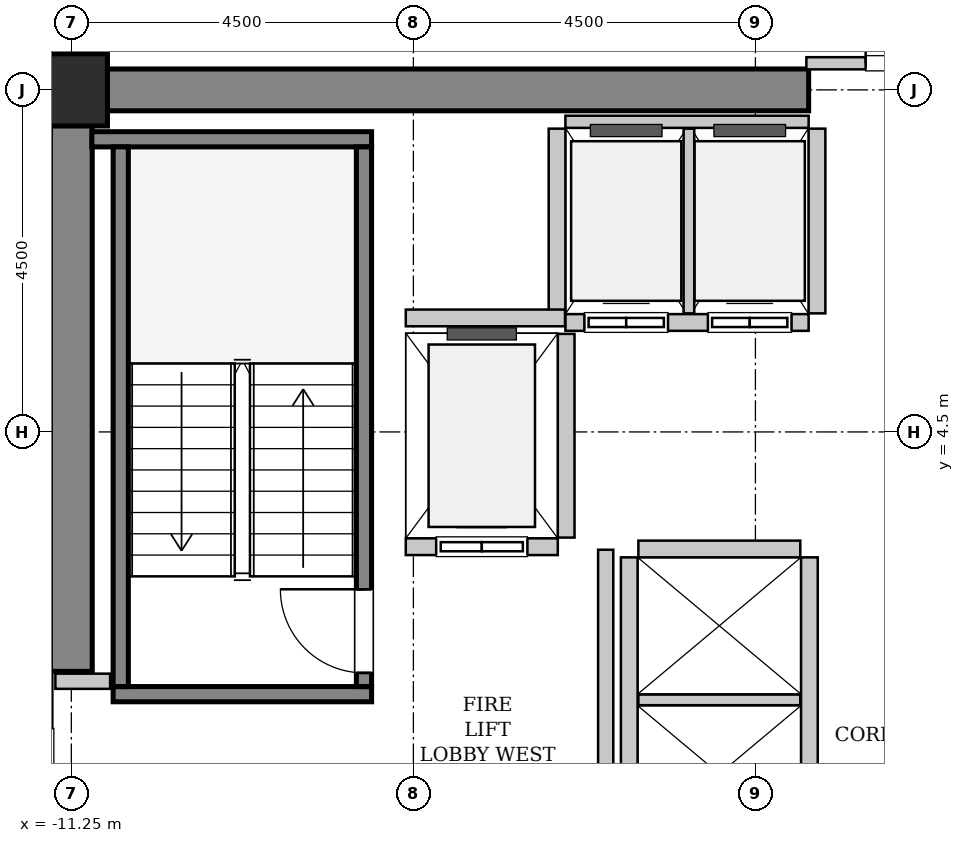
"""IFC4 building model, lengths in metres.
Left out: names, types, materials, properties, quantities, classifications, styles, units other than length and angle.
Written with IfcOpenShell. Run it as: python <this file> out.ifc"""

import sys

from ifc_helpers import new_model, si_unit, direction, frame, frame_2d, origin, origin_2d, place, context, subcontext, project, spatial, rectangle, hollow_rectangle, extrude, source, transform, mapped, element, fill, save


model = new_model("IFC4")
c1 = context("Model", 3, precision=1e-05, world=origin(), true_north=direction((0.0, 1.0)))
c2 = subcontext(c1, "Body", "Model", "MODEL_VIEW")
j1 = project(units=[si_unit("LENGTHUNIT", "METRE"), si_unit("PLANEANGLEUNIT", "RADIAN")], contexts=[c1])
p1 = place(None, origin())
s1 = spatial("IfcSite", under=j1, at=p1, CompositionType="ELEMENT")
p2 = place(p1, origin())
s2 = spatial("IfcBuilding", under=s1, at=p2, CompositionType="ELEMENT")
p3 = place(p2, frame((0.0, 0.0, 109.8)))
s3 = spatial("IfcBuildingStorey", under=s2, at=p3, CompositionType="ELEMENT", Elevation=109.8)
m1 = source(origin(), c2, "Body", "SweptSolid", [
    extrude(rectangle(XDim=9.975, YDim=0.55, at=frame_2d((4.987, 0.0))), origin(), (0.0, 0.0, 1.0), 3.8),
])
p4 = place(p3, frame((-11.525, 9.0, 0.0), z_axis=(0.0, 0.0, 1.0), x_axis=(1.0, 0.0, 0.0)))
e1 = element("IfcWall", 1, at=p4, inside=s3, PredefinedType="SHEAR", context=c2, shape_type="MappedRepresentation", body=[
    mapped(m1, transform((0.0, 0.0, 0.0), x_axis=(1.0, 0.0, 0.0), y_axis=(0.0, 1.0, 0.0), z_axis=(0.0, 0.0, 1.0), scale=1.0)),
])
m2 = source(origin(), c2, "Body", "SweptSolid", [
    extrude(rectangle(XDim=7.375, YDim=0.55, at=frame_2d((3.688, 0.0))), origin(), (0.0, 0.0, 1.0), 3.8),
])
p5 = place(p3, frame((-11.25, 1.35, 0.0), z_axis=(0.0, 0.0, 1.0), x_axis=(0.0, 1.0, 0.0)))
e2 = element("IfcWall", 2, at=p5, inside=s3, PredefinedType="SHEAR", context=c2, shape_type="MappedRepresentation", body=[
    mapped(m2, transform((0.0, 0.0, 0.0), x_axis=(1.0, 0.0, 0.0), y_axis=(0.0, 1.0, 0.0), z_axis=(0.0, 0.0, 1.0), scale=1.0)),
])
m3 = source(origin(), c2, "Body", "SweptSolid", [
    extrude(hollow_rectangle(XDim=0.95, YDim=0.95, WallThickness=0.045, InnerFilletRadius=0.045, OuterFilletRadius=0.09, at=origin_2d()), origin(), (0.0, 0.0, 1.0), 3.8),
])
p6 = place(p3, frame((-11.25, 9.0, 0.0), z_axis=(0.0, 0.0, 1.0), x_axis=(1.0, 0.0, 0.0)))
e3 = element("IfcColumn", 3, at=p6, inside=s3, PredefinedType="COLUMN", context=c2, shape_type="MappedRepresentation", body=[
    mapped(m3, transform((0.0, 0.0, 0.0), x_axis=(1.0, 0.0, 0.0), y_axis=(0.0, 1.0, 0.0), z_axis=(0.0, 0.0, 1.0), scale=1.0)),
])
m4 = source(origin(), c2, "Body", "SweptSolid", [
    extrude(rectangle(XDim=3.4, YDim=0.2, at=frame_2d((1.7, 0.0))), origin(), (0.0, 0.0, 1.0), 3.8),
])
p7 = place(p3, frame((-7.3, 1.05, 0.0), z_axis=(0.0, 0.0, 1.0), x_axis=(-1.0, 0.0, 0.0)))
e4 = element("IfcWall", 4, at=p7, inside=s3, PredefinedType="SOLIDWALL", context=c2, shape_type="MappedRepresentation", body=[
    mapped(m4, transform((0.0, 0.0, 0.0), x_axis=(1.0, 0.0, 0.0), y_axis=(0.0, 1.0, 0.0), z_axis=(0.0, 0.0, 1.0), scale=1.0)),
])
m5 = source(origin(), c2, "Body", "SweptSolid", [
    extrude(rectangle(XDim=3.68, YDim=0.2, at=frame_2d((1.84, 0.0))), origin(), (0.0, 0.0, 1.0), 3.8),
])
p8 = place(p3, frame((-7.3, 8.35, 0.0), z_axis=(0.0, 0.0, 1.0), x_axis=(-1.0, 0.0, 0.0)))
e5 = element("IfcWall", 5, at=p8, inside=s3, PredefinedType="SOLIDWALL", context=c2, shape_type="MappedRepresentation", body=[
    mapped(m5, transform((0.0, 0.0, 0.0), x_axis=(1.0, 0.0, 0.0), y_axis=(0.0, 1.0, 0.0), z_axis=(0.0, 0.0, 1.0), scale=1.0)),
])
m6 = source(origin(), c2, "Body", "SweptSolid", [
    extrude(rectangle(XDim=7.1, YDim=0.2, at=frame_2d((3.55, 0.0))), origin(), (0.0, 0.0, 1.0), 3.8),
])
p9 = place(p3, frame((-7.4, 1.15, 0.0), z_axis=(0.0, 0.0, 1.0), x_axis=(0.0, 1.0, 0.0)))
e6 = element("IfcWall", 6, at=p9, inside=s3, PredefinedType="SOLIDWALL", context=c2, shape_type="MappedRepresentation", body=[
    mapped(m6, transform((0.0, 0.0, 0.0), x_axis=(1.0, 0.0, 0.0), y_axis=(0.0, 1.0, 0.0), z_axis=(0.0, 0.0, 1.0), scale=1.0)),
])
p10 = place(p9, frame((0.18, 0.0, 0.0)))
e7 = element("IfcOpeningElement", 7, at=p10, cuts=e6, PredefinedType="OPENING", context=c2, shape_type="SweptSolid", body=[
    extrude(rectangle(XDim=1.1, YDim=2.15, at=frame_2d((0.55, 1.075))), frame((0.0, 0.11, 0.0), z_axis=(0.0, -1.0, 0.0), x_axis=(1.0, 0.0, 0.0)), (0.0, 0.0, 1.0), 0.22),
])
p11 = place(p3, frame((-10.6, 1.15, 0.0), z_axis=(0.0, 0.0, 1.0), x_axis=(0.0, 1.0, 0.0)))
e8 = element("IfcWall", 8, at=p11, inside=s3, PredefinedType="SOLIDWALL", context=c2, shape_type="MappedRepresentation", body=[
    mapped(m6, transform((0.0, 0.0, 0.0), x_axis=(1.0, 0.0, 0.0), y_axis=(0.0, 1.0, 0.0), z_axis=(0.0, 0.0, 1.0), scale=1.0)),
])
m7 = source(origin(), c2, "Body", "SweptSolid", [
    extrude(rectangle(XDim=2.0, YDim=0.22, at=frame_2d((1.0, 0.0))), origin(), (0.0, 0.0, 1.0), 3.535),
])
p12 = place(p3, frame((-6.85, 2.99, 0.0), z_axis=(0.0, 0.0, 1.0), x_axis=(1.0, 0.0, 0.0)))
e9 = element("IfcWall", 9, at=p12, inside=s3, PredefinedType="SOLIDWALL", context=c2, shape_type="MappedRepresentation", body=[
    mapped(m7, transform((0.0, 0.0, 0.0), x_axis=(1.0, 0.0, 0.0), y_axis=(0.0, 1.0, 0.0), z_axis=(0.0, 0.0, 1.0), scale=1.0)),
])
p13 = place(p12, frame((0.4, 0.0, 0.0)))
e10 = element("IfcOpeningElement", 10, at=p13, cuts=e9, PredefinedType="OPENING", context=c2, shape_type="SweptSolid", body=[
    extrude(rectangle(XDim=1.2, YDim=2.2, at=frame_2d((0.6, 1.1))), frame((0.0, 0.12, 0.0), z_axis=(0.0, -1.0, 0.0), x_axis=(1.0, 0.0, 0.0)), (0.0, 0.0, 1.0), 0.24),
])
m8 = source(origin(), c2, "Body", "SweptSolid", [
    extrude(rectangle(XDim=2.68, YDim=0.22, at=frame_2d((1.34, 0.0))), origin(), (0.0, 0.0, 1.0), 3.535),
])
p14 = place(p3, frame((-4.74, 3.11, 0.0), z_axis=(0.0, 0.0, 1.0), x_axis=(0.0, 1.0, 0.0)))
e11 = element("IfcWall", 11, at=p14, inside=s3, PredefinedType="SOLIDWALL", context=c2, shape_type="MappedRepresentation", body=[
    mapped(m8, transform((0.0, 0.0, 0.0), x_axis=(1.0, 0.0, 0.0), y_axis=(0.0, 1.0, 0.0), z_axis=(0.0, 0.0, 1.0), scale=1.0)),
])
m9 = source(origin(), c2, "Body", "SweptSolid", [
    extrude(rectangle(XDim=3.2, YDim=0.22, at=frame_2d((1.6, 0.0))), origin(), (0.0, 0.0, 1.0), 3.535),
])
p15 = place(p3, frame((-4.75, 5.94, 0.0), z_axis=(0.0, 0.0, 1.0), x_axis=(1.0, 0.0, 0.0)))
e12 = element("IfcWall", 12, at=p15, inside=s3, PredefinedType="SOLIDWALL", context=c2, shape_type="MappedRepresentation", body=[
    mapped(m9, transform((0.0, 0.0, 0.0), x_axis=(1.0, 0.0, 0.0), y_axis=(0.0, 1.0, 0.0), z_axis=(0.0, 0.0, 1.0), scale=1.0)),
])
p16 = place(p15, frame((0.25, 0.0, 0.0)))
e13 = element("IfcOpeningElement", 13, at=p16, cuts=e12, PredefinedType="OPENING", context=c2, shape_type="SweptSolid", body=[
    extrude(rectangle(XDim=1.1, YDim=2.2, at=frame_2d((0.55, 1.1))), frame((0.0, 0.12, 0.0), z_axis=(0.0, -1.0, 0.0), x_axis=(1.0, 0.0, 0.0)), (0.0, 0.0, 1.0), 0.24),
])
p17 = place(p15, frame((1.875, 0.0, 0.0)))
e14 = element("IfcOpeningElement", 14, at=p17, cuts=e12, PredefinedType="OPENING", context=c2, shape_type="SweptSolid", body=[
    extrude(rectangle(XDim=1.1, YDim=2.2, at=frame_2d((0.55, 1.1))), frame((0.0, 0.12, 0.0), z_axis=(0.0, -1.0, 0.0), x_axis=(1.0, 0.0, 0.0)), (0.0, 0.0, 1.0), 0.24),
])
m10 = source(origin(), c2, "Body", "SweptSolid", [
    extrude(rectangle(XDim=3.2, YDim=0.16, at=frame_2d((1.6, 0.0))), origin(), (0.0, 0.0, 1.0), 2.425),
])
p18 = place(p3, frame((-1.55, 8.58, 0.0), z_axis=(0.0, 0.0, 1.0), x_axis=(-1.0, 0.0, 0.0)))
e15 = element("IfcWall", 15, at=p18, inside=s3, PredefinedType="PARTITIONING", context=c2, shape_type="MappedRepresentation", body=[
    mapped(m10, transform((0.0, 0.0, 0.0), x_axis=(1.0, 0.0, 0.0), y_axis=(0.0, 1.0, 0.0), z_axis=(0.0, 0.0, 1.0), scale=1.0)),
])
m11 = source(origin(), c2, "Body", "SweptSolid", [
    extrude(rectangle(XDim=2.43, YDim=0.22, at=frame_2d((1.215, 0.0))), origin(), (0.0, 0.0, 1.0), 3.535),
])
p19 = place(p3, frame((-4.86, 8.49, 0.0), z_axis=(0.0, 0.0, 1.0), x_axis=(0.0, -1.0, 0.0)))
e16 = element("IfcWall", 16, at=p19, inside=s3, PredefinedType="SOLIDWALL", context=c2, shape_type="MappedRepresentation", body=[
    mapped(m11, transform((0.0, 0.0, 0.0), x_axis=(1.0, 0.0, 0.0), y_axis=(0.0, 1.0, 0.0), z_axis=(0.0, 0.0, 1.0), scale=1.0)),
])
m12 = source(origin(), c2, "Body", "SweptSolid", [
    extrude(rectangle(XDim=2.43, YDim=0.14, at=frame_2d((1.215, 0.0))), origin(), (0.0, 0.0, 1.0), 3.535),
])
p20 = place(p3, frame((-3.125, 6.06, 0.0), z_axis=(0.0, 0.0, 1.0), x_axis=(0.0, 1.0, 0.0)))
e17 = element("IfcWall", 17, at=p20, inside=s3, PredefinedType="PARTITIONING", context=c2, shape_type="MappedRepresentation", body=[
    mapped(m12, transform((0.0, 0.0, 0.0), x_axis=(1.0, 0.0, 0.0), y_axis=(0.0, 1.0, 0.0), z_axis=(0.0, 0.0, 1.0), scale=1.0)),
])
p21 = place(p3, frame((-1.44, 6.06, 0.0), z_axis=(0.0, 0.0, 1.0), x_axis=(0.0, 1.0, 0.0)))
e18 = element("IfcWall", 18, at=p21, inside=s3, PredefinedType="SOLIDWALL", context=c2, shape_type="MappedRepresentation", body=[
    mapped(m11, transform((0.0, 0.0, 0.0), x_axis=(1.0, 0.0, 0.0), y_axis=(0.0, 1.0, 0.0), z_axis=(0.0, 0.0, 1.0), scale=1.0)),
])
m13 = source(origin(), c2, "Body", "SweptSolid", [
    extrude(rectangle(XDim=5.7, YDim=0.22, at=frame_2d((2.85, 0.0))), origin(), (0.0, 0.0, 1.0), 3.535),
])
for number, where, z_axis, x_axis in (
    (19, (-1.54, -2.85, 0.0), (0.0, 0.0, 1.0), (0.0, 1.0, 0.0)),
    (20, (-3.91, 2.85, 0.0), (0.0, 0.0, 1.0), (0.0, -1.0, 0.0)),
):
    element("IfcWall", number, at=place(p3, frame(where, z_axis=z_axis, x_axis=x_axis)), inside=s3, PredefinedType="SOLIDWALL", context=c2, shape_type="MappedRepresentation", body=[
        mapped(m13, transform((0.0, 0.0, 0.0), x_axis=(1.0, 0.0, 0.0), y_axis=(0.0, 1.0, 0.0), z_axis=(0.0, 0.0, 1.0), scale=1.0)),
    ])
m14 = source(origin(), c2, "Body", "SweptSolid", [
    extrude(rectangle(XDim=2.13, YDim=0.14, at=frame_2d((1.065, 0.0))), origin(), (0.0, 0.0, 1.0), 3.535),
])
p22 = place(p3, frame((-3.79, 0.975, 0.0), z_axis=(0.0, 0.0, 1.0), x_axis=(1.0, 0.0, 0.0)))
e21 = element("IfcWall", 21, at=p22, inside=s3, PredefinedType="PARTITIONING", context=c2, shape_type="MappedRepresentation", body=[
    mapped(m14, transform((0.0, 0.0, 0.0), x_axis=(1.0, 0.0, 0.0), y_axis=(0.0, 1.0, 0.0), z_axis=(0.0, 0.0, 1.0), scale=1.0)),
])
m15 = source(origin(), c2, "Body", "SweptSolid", [
    extrude(rectangle(XDim=2.13, YDim=0.22, at=frame_2d((1.065, 0.0))), origin(), (0.0, 0.0, 1.0), 3.535),
])
p23 = place(p3, frame((-1.66, 2.96, 0.0), z_axis=(0.0, 0.0, 1.0), x_axis=(-1.0, 0.0, 0.0)))
e22 = element("IfcWall", 22, at=p23, inside=s3, PredefinedType="SOLIDWALL", context=c2, shape_type="MappedRepresentation", body=[
    mapped(m15, transform((0.0, 0.0, 0.0), x_axis=(1.0, 0.0, 0.0), y_axis=(0.0, 1.0, 0.0), z_axis=(0.0, 0.0, 1.0), scale=1.0)),
])
m16 = source(origin(), c2, "Body", "SweptSolid", [
    extrude(rectangle(XDim=2.095, YDim=0.22, at=frame_2d((1.048, 0.0))), origin(), (0.0, 0.0, 1.0), 3.535),
])
p24 = place(p3, frame((-6.85, 6.0, 0.0), z_axis=(0.0, 0.0, 1.0), x_axis=(1.0, 0.0, 0.0)))
e23 = element("IfcWall", 23, at=p24, inside=s3, PredefinedType="SOLIDWALL", context=c2, shape_type="MappedRepresentation", body=[
    mapped(m16, transform((0.0, 0.0, 0.0), x_axis=(1.0, 0.0, 0.0), y_axis=(0.0, 1.0, 0.0), z_axis=(0.0, 0.0, 1.0), scale=1.0)),
])
m17 = source(origin(), c2, "Body", "SweptSolid", [
    extrude(rectangle(XDim=5.9, YDim=0.2, at=frame_2d((2.95, 0.0))), origin(), (0.0, 0.0, 1.0), 3.535),
])
p25 = place(p3, frame((-4.22, -2.95, 0.0), z_axis=(0.0, 0.0, 1.0), x_axis=(0.0, 1.0, 0.0)))
e24 = element("IfcWall", 24, at=p25, inside=s3, PredefinedType="PARTITIONING", context=c2, shape_type="MappedRepresentation", body=[
    mapped(m17, transform((0.0, 0.0, 0.0), x_axis=(1.0, 0.0, 0.0), y_axis=(0.0, 1.0, 0.0), z_axis=(0.0, 0.0, 1.0), scale=1.0)),
])
m18 = source(origin(), c2, "Body", "SweptSolid", [
    extrude(rectangle(XDim=0.72, YDim=0.2, at=frame_2d((0.36, 0.0))), origin(), (0.0, 0.0, 1.0), 3.535),
])
p26 = place(p3, frame((-11.46, 1.22, 0.0), z_axis=(0.0, 0.0, 1.0), x_axis=(1.0, 0.0, 0.0)))
e25 = element("IfcWall", 25, at=p26, inside=s3, PredefinedType="PARTITIONING", context=c2, shape_type="MappedRepresentation", body=[
    mapped(m18, transform((0.0, 0.0, 0.0), x_axis=(1.0, 0.0, 0.0), y_axis=(0.0, 1.0, 0.0), z_axis=(0.0, 0.0, 1.0), scale=1.0)),
])
m19 = source(origin(), c2, "Body", "SweptSolid", [
    extrude(rectangle(XDim=3.16, YDim=0.16, at=frame_2d((1.58, 0.0))), origin(), (0.0, 0.0, 1.0), 2.425),
])
p27 = place(p3, frame((-1.58, 9.35, 0.0), z_axis=(0.0, 0.0, 1.0), x_axis=(1.0, 0.0, 0.0)))
e26 = element("IfcWall", 26, at=p27, inside=s3, PredefinedType="PARTITIONING", context=c2, shape_type="MappedRepresentation", body=[
    mapped(m19, transform((0.0, 0.0, 0.0), x_axis=(1.0, 0.0, 0.0), y_axis=(0.0, 1.0, 0.0), z_axis=(0.0, 0.0, 1.0), scale=1.0)),
])
p28 = place(p27, frame((0.78, 0.0, 0.0)))
e27 = element("IfcOpeningElement", 27, at=p28, cuts=e26, PredefinedType="OPENING", context=c2, shape_type="SweptSolid", body=[
    extrude(rectangle(XDim=1.6, YDim=2.3, at=frame_2d((0.8, 1.15))), frame((0.0, 0.09, 0.0), z_axis=(0.0, -1.0, 0.0), x_axis=(1.0, 0.0, 0.0)), (0.0, 0.0, 1.0), 0.18),
])
m20 = source(origin(), c2, "Body", "SweptSolid", [
    extrude(rectangle(XDim=1.1, YDim=2.15, at=frame_2d((0.55, 1.075))), frame((0.0, 0.025, 0.0), z_axis=(0.0, -1.0, 0.0), x_axis=(1.0, 0.0, 0.0)), (0.0, 0.0, 1.0), 0.05),
])
p29 = place(p10, origin())
e28 = element("IfcDoor", 28, at=p29, inside=s3, OperationType="SINGLE_SWING_RIGHT", PredefinedType="DOOR", context=c2, shape_type="MappedRepresentation", body=[
    mapped(m20, transform((0.0, 0.0, 0.0), x_axis=(1.0, 0.0, 0.0), y_axis=(0.0, 1.0, 0.0), z_axis=(0.0, 0.0, 1.0), scale=1.0)),
])
fill(e7, e28)
m21 = source(origin(), c2, "Body", "SweptSolid", [
    extrude(rectangle(XDim=1.2, YDim=2.2, at=frame_2d((0.6, 1.1))), frame((0.0, 0.025, 0.0), z_axis=(0.0, -1.0, 0.0), x_axis=(1.0, 0.0, 0.0)), (0.0, 0.0, 1.0), 0.05),
])
p30 = place(p13, origin())
e29 = element("IfcDoor", 29, at=p30, inside=s3, OperationType="SLIDING_TO_LEFT", PredefinedType="DOOR", context=c2, shape_type="MappedRepresentation", body=[
    mapped(m21, transform((0.0, 0.0, 0.0), x_axis=(1.0, 0.0, 0.0), y_axis=(0.0, 1.0, 0.0), z_axis=(0.0, 0.0, 1.0), scale=1.0)),
])
fill(e10, e29)
m22 = source(origin(), c2, "Body", "SweptSolid", [
    extrude(rectangle(XDim=1.1, YDim=2.2, at=frame_2d((0.55, 1.1))), frame((0.0, 0.025, 0.0), z_axis=(0.0, -1.0, 0.0), x_axis=(1.0, 0.0, 0.0)), (0.0, 0.0, 1.0), 0.05),
])
p31 = place(p16, origin())
e30 = element("IfcDoor", 30, at=p31, inside=s3, OperationType="DOUBLE_DOOR_SLIDING", PredefinedType="DOOR", context=c2, shape_type="MappedRepresentation", body=[
    mapped(m22, transform((0.0, 0.0, 0.0), x_axis=(1.0, 0.0, 0.0), y_axis=(0.0, 1.0, 0.0), z_axis=(0.0, 0.0, 1.0), scale=1.0)),
])
fill(e13, e30)
p32 = place(p17, origin())
e31 = element("IfcDoor", 31, at=p32, inside=s3, OperationType="DOUBLE_DOOR_SLIDING", PredefinedType="DOOR", context=c2, shape_type="MappedRepresentation", body=[
    mapped(m22, transform((0.0, 0.0, 0.0), x_axis=(1.0, 0.0, 0.0), y_axis=(0.0, 1.0, 0.0), z_axis=(0.0, 0.0, 1.0), scale=1.0)),
])
fill(e14, e31)
m23 = source(origin(), c2, "Body", "SweptSolid", [
    extrude(rectangle(XDim=1.6, YDim=2.3, at=frame_2d((0.8, 1.15))), frame((0.0, 0.025, 0.0), z_axis=(0.0, -1.0, 0.0), x_axis=(1.0, 0.0, 0.0)), (0.0, 0.0, 1.0), 0.05),
])
p33 = place(p28, origin())
e32 = element("IfcDoor", 32, at=p33, inside=s3, OperationType="DOUBLE_DOOR_SINGLE_SWING", PredefinedType="DOOR", context=c2, shape_type="MappedRepresentation", body=[
    mapped(m23, transform((0.0, 0.0, 0.0), x_axis=(1.0, 0.0, 0.0), y_axis=(0.0, 1.0, 0.0), z_axis=(0.0, 0.0, 1.0), scale=1.0)),
])
fill(e27, e32)
save(model, sys.argv[1])
